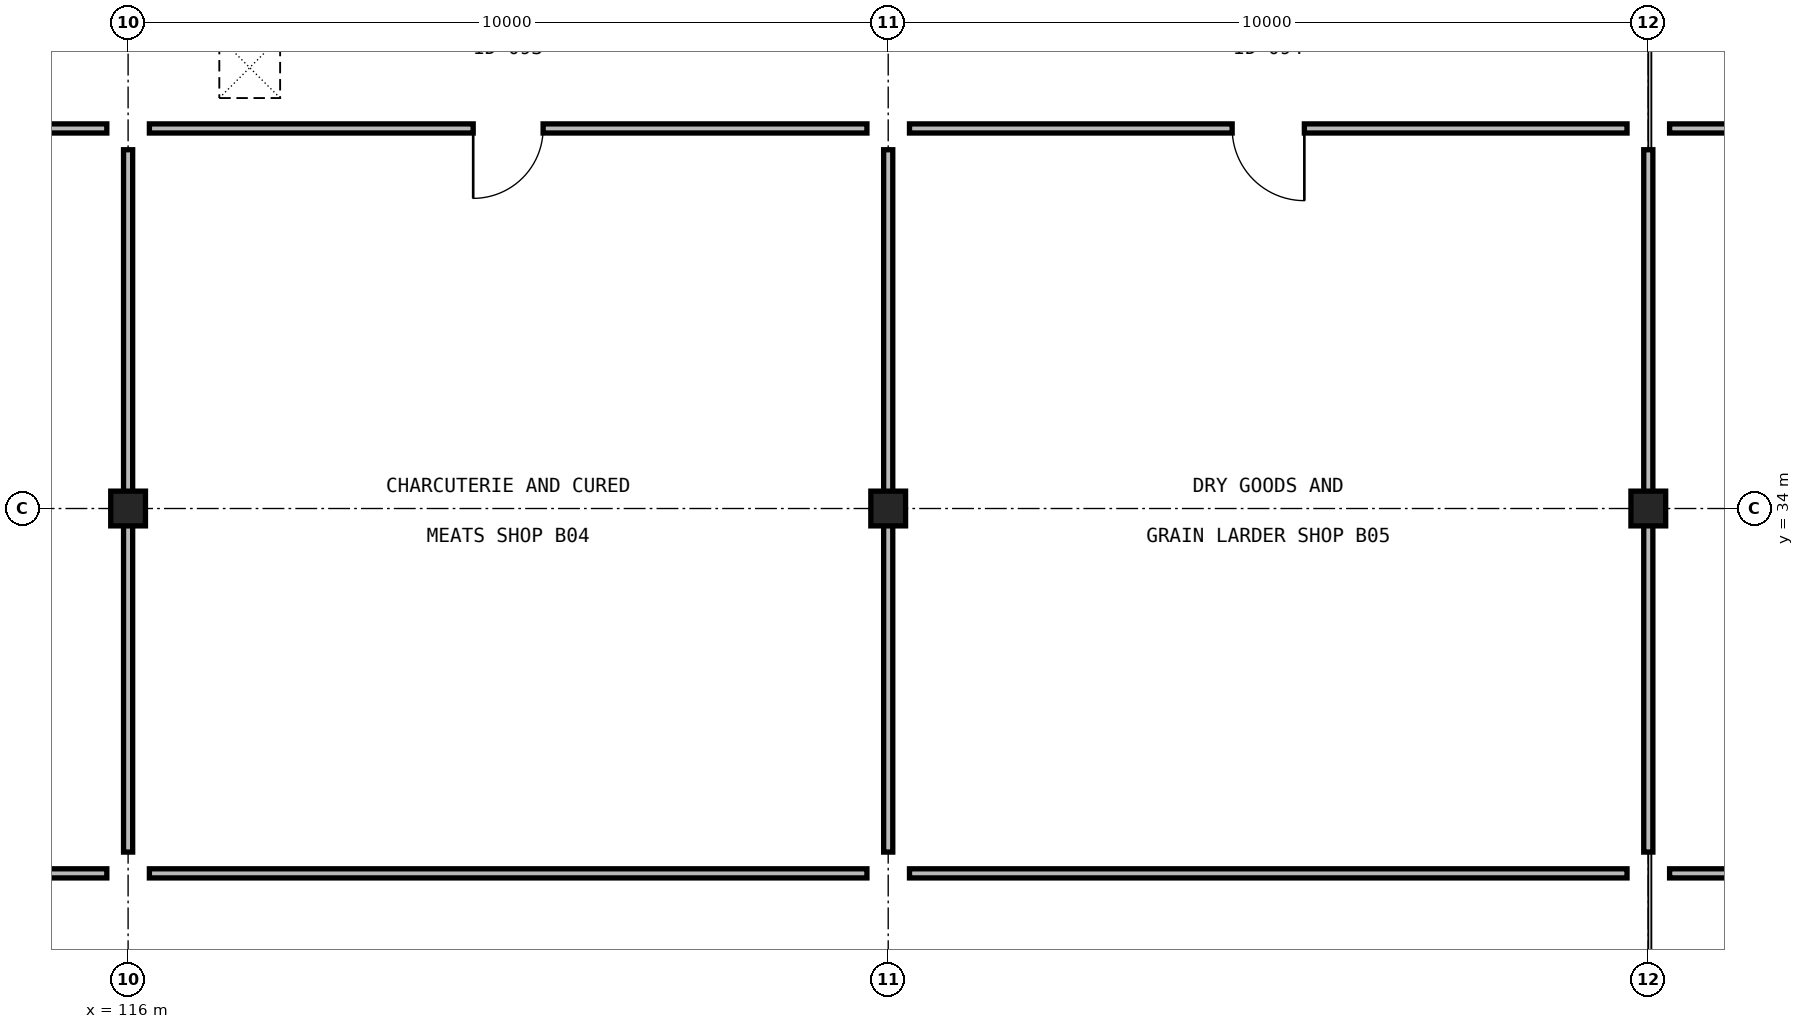
"""IFC4 building model, lengths in metres.
Left out: names, types, materials, properties, quantities, classifications, styles, units other than length and angle.
Written with IfcOpenShell. Run it as: python <this file> out.ifc"""

import sys

from ifc_helpers import new_model, si_unit, direction, frame, frame_2d, origin, origin_2d_with_axis, place, context, subcontext, project, spatial, rectangle, hollow_circle, extrude, element, fill, save


model = new_model("IFC4")
c1 = context("Model", 3, precision=1e-05, world=origin(), true_north=direction((0.0, 1.0)))
c2 = subcontext(c1, "Body", "Model", "MODEL_VIEW")
j1 = project(units=[si_unit("LENGTHUNIT", "METRE"), si_unit("PLANEANGLEUNIT", "RADIAN")], contexts=[c1])
p1 = place(None, origin())
s1 = spatial("IfcSite", under=j1, at=p1, CompositionType="ELEMENT")
p2 = place(p1, origin())
s2 = spatial("IfcBuilding", under=s1, at=p2, CompositionType="ELEMENT")
p3 = place(p2, frame((0.0, 0.0, -4.5)))
s3 = spatial("IfcBuildingStorey", under=s2, at=p3, CompositionType="ELEMENT", Elevation=-4.5)
for number, where, z_axis, x_axis in (
    (1, (116.0, 34.0, -0.45), (0.0, 0.0, 1.0), (1.0, 0.0, 0.0)),
    (2, (126.0, 34.0, -0.45), (0.0, 0.0, 1.0), (1.0, 0.0, 0.0)),
    (3, (136.0, 34.0, -0.45), (0.0, 0.0, 1.0), (1.0, 0.0, 0.0)),
):
    element("IfcColumn", number, at=place(p3, frame(where, z_axis=z_axis, x_axis=x_axis)), inside=s3, PredefinedType="COLUMN", context=c2, shape_type="SweptSolid", body=[
        extrude(hollow_circle(Radius=0.229, WallThickness=0.013, at=origin_2d_with_axis()), origin(), (0.0, 0.0, 1.0), 4.95),
    ])
p4 = place(p3, frame((106.28, 29.2, 0.0), z_axis=(0.0, 0.0, 1.0), x_axis=(1.0, 0.0, 0.0)))
e4 = element("IfcWall", 4, at=p4, inside=s3, PredefinedType="PARTITIONING", context=c2, shape_type="SweptSolid", body=[
    extrude(rectangle(XDim=9.44, YDim=0.12, at=frame_2d((4.72, 0.0), x_axis=(1.0, 0.0))), origin(), (0.0, 0.0, 1.0), 3.58),
])
p5 = place(p3, frame((116.0, 29.48, 0.0), z_axis=(0.0, 0.0, 1.0), x_axis=(0.0, 1.0, 0.0)))
e5 = element("IfcWall", 5, at=p5, inside=s3, PredefinedType="PARTITIONING", context=c2, shape_type="SweptSolid", body=[
    extrude(rectangle(XDim=9.24, YDim=0.12, at=frame_2d((4.62, 0.0), x_axis=(1.0, 0.0))), origin(), (0.0, 0.0, 1.0), 3.58),
])
p6 = place(p3, frame((115.72, 39.0, 0.0), z_axis=(0.0, 0.0, 1.0), x_axis=(-1.0, 0.0, 0.0)))
e6 = element("IfcWall", 6, at=p6, inside=s3, PredefinedType="PARTITIONING", context=c2, shape_type="SweptSolid", body=[
    extrude(rectangle(XDim=9.44, YDim=0.12, at=frame_2d((4.72, 0.0), x_axis=(1.0, 0.0))), origin(), (0.0, 0.0, 1.0), 3.58),
])
p7 = place(p6, frame((4.245, 0.0, 0.0)))
e7 = element("IfcOpeningElement", 7, at=p7, cuts=e6, PredefinedType="OPENING", context=c2, shape_type="SweptSolid", body=[
    extrude(rectangle(XDim=0.95, YDim=2.15, at=frame_2d((0.475, 1.075), x_axis=(1.0, 0.0))), frame((0.0, 0.07, 0.0), z_axis=(0.0, -1.0, 0.0), x_axis=(1.0, 0.0, 0.0)), (0.0, 0.0, 1.0), 0.14),
])
p8 = place(p3, frame((116.28, 29.2, 0.0), z_axis=(0.0, 0.0, 1.0), x_axis=(1.0, 0.0, 0.0)))
e8 = element("IfcWall", 8, at=p8, inside=s3, PredefinedType="PARTITIONING", context=c2, shape_type="SweptSolid", body=[
    extrude(rectangle(XDim=9.44, YDim=0.12, at=frame_2d((4.72, 0.0), x_axis=(1.0, 0.0))), origin(), (0.0, 0.0, 1.0), 3.58),
])
p9 = place(p3, frame((126.0, 29.48, 0.0), z_axis=(0.0, 0.0, 1.0), x_axis=(0.0, 1.0, 0.0)))
e9 = element("IfcWall", 9, at=p9, inside=s3, PredefinedType="PARTITIONING", context=c2, shape_type="SweptSolid", body=[
    extrude(rectangle(XDim=9.24, YDim=0.12, at=frame_2d((4.62, 0.0), x_axis=(1.0, 0.0))), origin(), (0.0, 0.0, 1.0), 3.58),
])
p10 = place(p3, frame((125.72, 39.0, 0.0), z_axis=(0.0, 0.0, 1.0), x_axis=(-1.0, 0.0, 0.0)))
e10 = element("IfcWall", 10, at=p10, inside=s3, PredefinedType="PARTITIONING", context=c2, shape_type="SweptSolid", body=[
    extrude(rectangle(XDim=9.44, YDim=0.12, at=frame_2d((4.72, 0.0), x_axis=(1.0, 0.0))), origin(), (0.0, 0.0, 1.0), 3.58),
])
p11 = place(p10, frame((4.26, 0.0, 0.0)))
e11 = element("IfcOpeningElement", 11, at=p11, cuts=e10, PredefinedType="OPENING", context=c2, shape_type="SweptSolid", body=[
    extrude(rectangle(XDim=0.92, YDim=2.15, at=frame_2d((0.46, 1.075), x_axis=(1.0, 0.0))), frame((0.0, 0.07, 0.0), z_axis=(0.0, -1.0, 0.0), x_axis=(1.0, 0.0, 0.0)), (0.0, 0.0, 1.0), 0.14),
])
p12 = place(p3, frame((126.28, 29.2, 0.0), z_axis=(0.0, 0.0, 1.0), x_axis=(1.0, 0.0, 0.0)))
e12 = element("IfcWall", 12, at=p12, inside=s3, PredefinedType="PARTITIONING", context=c2, shape_type="SweptSolid", body=[
    extrude(rectangle(XDim=9.44, YDim=0.12, at=frame_2d((4.72, 0.0), x_axis=(1.0, 0.0))), origin(), (0.0, 0.0, 1.0), 3.58),
])
p13 = place(p3, frame((136.0, 29.48, 0.0), z_axis=(0.0, 0.0, 1.0), x_axis=(0.0, 1.0, 0.0)))
e13 = element("IfcWall", 13, at=p13, inside=s3, PredefinedType="PARTITIONING", context=c2, shape_type="SweptSolid", body=[
    extrude(rectangle(XDim=9.24, YDim=0.12, at=frame_2d((4.62, 0.0), x_axis=(1.0, 0.0))), origin(), (0.0, 0.0, 1.0), 3.58),
])
p14 = place(p3, frame((135.72, 39.0, 0.0), z_axis=(0.0, 0.0, 1.0), x_axis=(-1.0, 0.0, 0.0)))
e14 = element("IfcWall", 14, at=p14, inside=s3, PredefinedType="PARTITIONING", context=c2, shape_type="SweptSolid", body=[
    extrude(rectangle(XDim=9.44, YDim=0.12, at=frame_2d((4.72, 0.0), x_axis=(1.0, 0.0))), origin(), (0.0, 0.0, 1.0), 3.58),
])
p15 = place(p14, frame((4.245, 0.0, 0.0)))
e15 = element("IfcOpeningElement", 15, at=p15, cuts=e14, PredefinedType="OPENING", context=c2, shape_type="SweptSolid", body=[
    extrude(rectangle(XDim=0.95, YDim=2.15, at=frame_2d((0.475, 1.075), x_axis=(1.0, 0.0))), frame((0.0, 0.07, 0.0), z_axis=(0.0, -1.0, 0.0), x_axis=(1.0, 0.0, 0.0)), (0.0, 0.0, 1.0), 0.14),
])
p16 = place(p3, frame((136.28, 29.2, 0.0), z_axis=(0.0, 0.0, 1.0), x_axis=(1.0, 0.0, 0.0)))
e16 = element("IfcWall", 16, at=p16, inside=s3, PredefinedType="PARTITIONING", context=c2, shape_type="SweptSolid", body=[
    extrude(rectangle(XDim=9.44, YDim=0.12, at=frame_2d((4.72, 0.0), x_axis=(1.0, 0.0))), origin(), (0.0, 0.0, 1.0), 3.58),
])
p17 = place(p3, frame((145.72, 39.0, 0.0), z_axis=(0.0, 0.0, 1.0), x_axis=(-1.0, 0.0, 0.0)))
e17 = element("IfcWall", 17, at=p17, inside=s3, PredefinedType="PARTITIONING", context=c2, shape_type="SweptSolid", body=[
    extrude(rectangle(XDim=9.44, YDim=0.12, at=frame_2d((4.72, 0.0), x_axis=(1.0, 0.0))), origin(), (0.0, 0.0, 1.0), 3.58),
])
p18 = place(p17, frame((4.26, 0.0, 0.0)))
e18 = element("IfcOpeningElement", 18, at=p18, cuts=e17, PredefinedType="OPENING", context=c2, shape_type="SweptSolid", body=[
    extrude(rectangle(XDim=0.92, YDim=2.15, at=frame_2d((0.46, 1.075), x_axis=(1.0, 0.0))), frame((0.0, 0.07, 0.0), z_axis=(0.0, -1.0, 0.0), x_axis=(1.0, 0.0, 0.0)), (0.0, 0.0, 1.0), 0.14),
])
p19 = place(p11, origin())
e19 = element("IfcDoor", 19, at=p19, inside=s3, OperationType="SINGLE_SWING_RIGHT", PredefinedType="DOOR", context=c2, shape_type="SweptSolid", body=[
    extrude(rectangle(XDim=0.92, YDim=2.15, at=frame_2d((0.46, 1.075), x_axis=(1.0, 0.0))), frame((0.0, 0.025, 0.0), z_axis=(0.0, -1.0, 0.0), x_axis=(1.0, 0.0, 0.0)), (0.0, 0.0, 1.0), 0.05),
])
fill(e11, e19)
p20 = place(p15, origin())
e20 = element("IfcDoor", 20, at=p20, inside=s3, OperationType="SINGLE_SWING_LEFT", PredefinedType="DOOR", context=c2, shape_type="SweptSolid", body=[
    extrude(rectangle(XDim=0.95, YDim=2.15, at=frame_2d((0.475, 1.075), x_axis=(1.0, 0.0))), frame((0.0, 0.025, 0.0), z_axis=(0.0, -1.0, 0.0), x_axis=(1.0, 0.0, 0.0)), (0.0, 0.0, 1.0), 0.05),
])
fill(e15, e20)
save(model, sys.argv[1])
